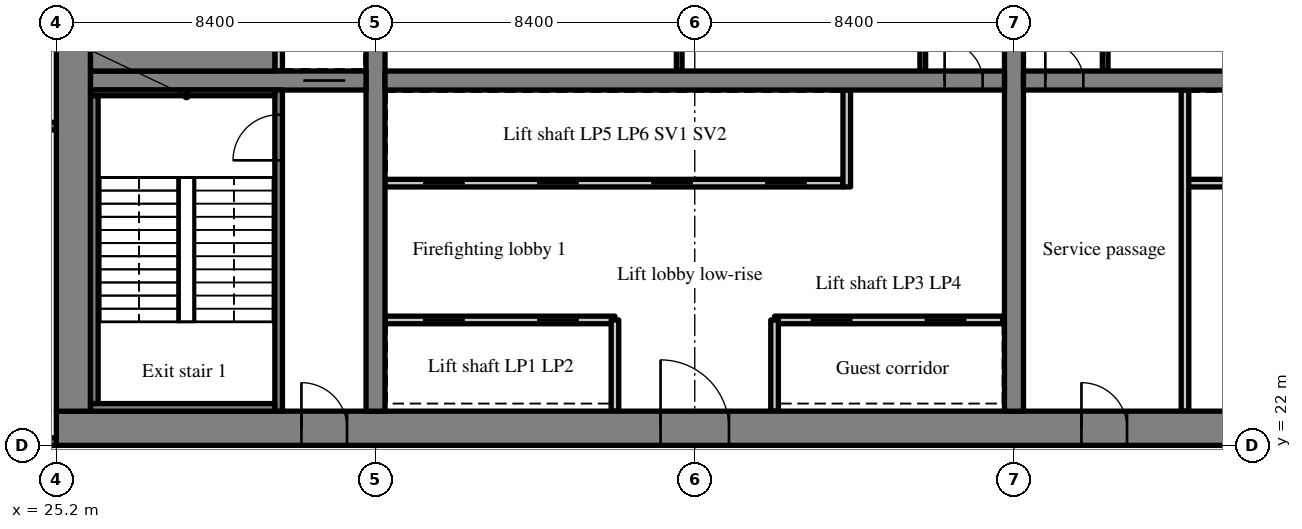
"""IFC4 building model, lengths in metres.
Left out: names, types, materials, properties, quantities, classifications, styles, units other than length and angle.
Written with IfcOpenShell. Run it as: python <this file> out.ifc"""

import sys

from ifc_helpers import new_model, si_unit, direction, frame, frame_2d, origin, place, context, subcontext, project, spatial, rectangle, extrude, source, transform, mapped, element, fill, save


model = new_model("IFC4")
c1 = context("Model", 3, precision=1e-05, world=origin(), true_north=direction((0.0, 1.0)))
c2 = subcontext(c1, "Body", "Model", "MODEL_VIEW")
j1 = project(units=[si_unit("LENGTHUNIT", "METRE"), si_unit("PLANEANGLEUNIT", "RADIAN")], contexts=[c1])
p1 = place(None, origin())
s1 = spatial("IfcSite", under=j1, at=p1, CompositionType="ELEMENT")
p2 = place(p1, origin())
s2 = spatial("IfcBuilding", under=s1, at=p2, CompositionType="ELEMENT")
p3 = place(p2, frame((0.0, 0.0, 102.8)))
s3 = spatial("IfcBuildingStorey", under=s2, at=p3, CompositionType="ELEMENT", Elevation=102.8)
m1 = source(origin(), c2, "Body", "SweptSolid", [
    extrude(rectangle(XDim=50.4, YDim=0.9, at=frame_2d((25.2, 0.0))), origin(), (0.0, 0.0, 1.0), 3.52),
])
p4 = place(p3, frame((25.2, 22.45, 0.0), z_axis=(0.0, 0.0, 1.0), x_axis=(1.0, 0.0, 0.0)))
e1 = element("IfcWall", 1, at=p4, inside=s3, PredefinedType="SHEAR", context=c2, shape_type="MappedRepresentation", body=[
    mapped(m1, transform((0.0, 0.0, 0.0), scale=1.0)),
])
m2 = source(origin(), c2, "Body", "SweptSolid", [
    extrude(rectangle(XDim=1.8, YDim=2.1, at=frame_2d((0.9, 1.05))), frame((0.0, 0.46, 0.0), z_axis=(0.0, -1.0, 0.0), x_axis=(1.0, 0.0, 0.0)), (0.0, 0.0, 1.0), 0.92),
])
p5 = place(p4, frame((15.9, 0.0, 0.0)))
e2 = element("IfcOpeningElement", 2, at=p5, cuts=e1, PredefinedType="OPENING", context=c2, shape_type="MappedRepresentation", body=[
    mapped(m2, transform((0.0, 0.0, 0.0), scale=1.0)),
])
m3 = source(origin(), c2, "Body", "SweptSolid", [
    extrude(rectangle(XDim=1.2, YDim=2.1, at=frame_2d((0.6, 1.05))), frame((0.0, 0.46, 0.0), z_axis=(0.0, -1.0, 0.0), x_axis=(1.0, 0.0, 0.0)), (0.0, 0.0, 1.0), 0.92),
])
p6 = place(p4, frame((26.975, 0.0, 0.0)))
e3 = element("IfcOpeningElement", 3, at=p6, cuts=e1, PredefinedType="OPENING", context=c2, shape_type="MappedRepresentation", body=[
    mapped(m3, transform((0.0, 0.0, 0.0), scale=1.0)),
])
m4 = source(origin(), c2, "Body", "SweptSolid", [
    extrude(rectangle(XDim=0.9, YDim=2.1, at=frame_2d((0.45, 1.05))), frame((0.0, 0.46, 0.0), z_axis=(0.0, -1.0, 0.0), x_axis=(1.0, 0.0, 0.0)), (0.0, 0.0, 1.0), 0.92),
])
p7 = place(p4, frame((32.25, 0.0, 0.0)))
e4 = element("IfcOpeningElement", 4, at=p7, cuts=e1, PredefinedType="OPENING", context=c2, shape_type="MappedRepresentation", body=[
    mapped(m4, transform((0.0, 0.0, 0.0), scale=1.0)),
])
p8 = place(p4, frame((38.275, 0.0, 0.0)))
e5 = element("IfcOpeningElement", 5, at=p8, cuts=e1, PredefinedType="OPENING", context=c2, shape_type="MappedRepresentation", body=[
    mapped(m4, transform((0.0, 0.0, 0.0), scale=1.0)),
])
p9 = place(p4, frame((6.45, 0.0, 0.0)))
e6 = element("IfcOpeningElement", 6, at=p9, cuts=e1, PredefinedType="OPENING", context=c2, shape_type="MappedRepresentation", body=[
    mapped(m3, transform((0.0, 0.0, 0.0), scale=1.0)),
])
p10 = place(p4, frame((47.775, 0.0, 0.0)))
e7 = element("IfcOpeningElement", 7, at=p10, cuts=e1, PredefinedType="OPENING", context=c2, shape_type="MappedRepresentation", body=[
    mapped(m3, transform((0.0, 0.0, 0.0), scale=1.0)),
])
m5 = source(origin(), c2, "Body", "SweptSolid", [
    extrude(rectangle(XDim=18.2, YDim=0.9, at=frame_2d((9.1, 0.0))), origin(), (0.0, 0.0, 1.0), 3.52),
])
p11 = place(p3, frame((25.65, 22.9, 0.0), z_axis=(0.0, 0.0, 1.0), x_axis=(0.0, 1.0, 0.0)))
e8 = element("IfcWall", 8, at=p11, inside=s3, PredefinedType="SHEAR", context=c2, shape_type="MappedRepresentation", body=[
    mapped(m5, transform((0.0, 0.0, 0.0), scale=1.0)),
])
m6 = source(origin(), c2, "Body", "SweptSolid", [
    extrude(rectangle(XDim=18.2, YDim=0.5, at=frame_2d((9.1, 0.0))), origin(), (0.0, 0.0, 1.0), 3.52),
])
p12 = place(p3, frame((33.6, 22.9, 0.0), z_axis=(0.0, 0.0, 1.0), x_axis=(0.0, 1.0, 0.0)))
e9 = element("IfcWall", 9, at=p12, inside=s3, PredefinedType="SHEAR", context=c2, shape_type="MappedRepresentation", body=[
    mapped(m6, transform((0.0, 0.0, 0.0), scale=1.0)),
])
m7 = source(origin(), c2, "Body", "SweptSolid", [
    extrude(rectangle(XDim=1.1, YDim=2.1, at=frame_2d((0.55, 1.05))), frame((0.0, 0.26, 0.0), z_axis=(0.0, -1.0, 0.0), x_axis=(1.0, 0.0, 0.0)), (0.0, 0.0, 1.0), 0.52),
])
p13 = place(p12, frame((12.55, 0.0, 0.0)))
e10 = element("IfcOpeningElement", 10, at=p13, cuts=e9, PredefinedType="OPENING", context=c2, shape_type="MappedRepresentation", body=[
    mapped(m7, transform((0.0, 0.0, 0.0), scale=1.0)),
])
p14 = place(p3, frame((50.4, 22.9, 0.0), z_axis=(0.0, 0.0, 1.0), x_axis=(0.0, 1.0, 0.0)))
e11 = element("IfcWall", 11, at=p14, inside=s3, PredefinedType="SHEAR", context=c2, shape_type="MappedRepresentation", body=[
    mapped(m6, transform((0.0, 0.0, 0.0), scale=1.0)),
])
p15 = place(p14, frame((12.55, 0.0, 0.0)))
e12 = element("IfcOpeningElement", 12, at=p15, cuts=e11, PredefinedType="OPENING", context=c2, shape_type="MappedRepresentation", body=[
    mapped(m7, transform((0.0, 0.0, 0.0), scale=1.0)),
])
m8 = source(origin(), c2, "Body", "SweptSolid", [
    extrude(rectangle(XDim=7.25, YDim=0.5, at=frame_2d((3.625, 0.0))), origin(), (0.0, 0.0, 1.0), 3.52),
])
p16 = place(p3, frame((26.1, 31.6, 0.0), z_axis=(0.0, 0.0, 1.0), x_axis=(1.0, 0.0, 0.0)))
e13 = element("IfcWall", 13, at=p16, inside=s3, PredefinedType="SHEAR", context=c2, shape_type="MappedRepresentation", body=[
    mapped(m8, transform((0.0, 0.0, 0.0), scale=1.0)),
])
p17 = place(p16, frame((5.6, 0.0, 0.0)))
e14 = element("IfcOpeningElement", 14, at=p17, cuts=e13, PredefinedType="OPENING", context=c2, shape_type="MappedRepresentation", body=[
    mapped(m7, transform((0.0, 0.0, 0.0), scale=1.0)),
])
m9 = source(origin(), c2, "Body", "SweptSolid", [
    extrude(rectangle(XDim=16.3, YDim=0.5, at=frame_2d((8.15, 0.0))), origin(), (0.0, 0.0, 1.0), 3.52),
])
p18 = place(p3, frame((33.85, 31.6, 0.0), z_axis=(0.0, 0.0, 1.0), x_axis=(1.0, 0.0, 0.0)))
e15 = element("IfcWall", 15, at=p18, inside=s3, PredefinedType="SHEAR", context=c2, shape_type="MappedRepresentation", body=[
    mapped(m9, transform((0.0, 0.0, 0.0), scale=1.0)),
])
m10 = source(origin(), c2, "Body", "SweptSolid", [
    extrude(rectangle(XDim=1.0, YDim=2.1, at=frame_2d((0.5, 1.05))), frame((0.0, 0.26, 0.0), z_axis=(0.0, -1.0, 0.0), x_axis=(1.0, 0.0, 0.0)), (0.0, 0.0, 1.0), 0.52),
])
p19 = place(p18, frame((14.725, 0.0, 0.0)))
e16 = element("IfcOpeningElement", 16, at=p19, cuts=e15, PredefinedType="OPENING", context=c2, shape_type="MappedRepresentation", body=[
    mapped(m10, transform((0.0, 0.0, 0.0), scale=1.0)),
])
m11 = source(origin(), c2, "Body", "SweptSolid", [
    extrude(rectangle(XDim=16.3, YDim=0.5, at=frame_2d((8.15, 0.0))), origin(), (0.0, 0.0, 1.0), 3.52),
])
p20 = place(p3, frame((50.65, 31.6, 0.0), z_axis=(0.0, 0.0, 1.0), x_axis=(1.0, 0.0, 0.0)))
e17 = element("IfcWall", 17, at=p20, inside=s3, PredefinedType="SHEAR", context=c2, shape_type="MappedRepresentation", body=[
    mapped(m11, transform((0.0, 0.0, 0.0), scale=1.0)),
])
p21 = place(p20, frame((0.575, 0.0, 0.0)))
e18 = element("IfcOpeningElement", 18, at=p21, cuts=e17, PredefinedType="OPENING", context=c2, shape_type="MappedRepresentation", body=[
    mapped(m10, transform((0.0, 0.0, 0.0), scale=1.0)),
])
m12 = source(origin(), c2, "Body", "SweptSolid", [
    extrude(rectangle(XDim=6.05, YDim=0.2, at=frame_2d((3.025, 0.0))), origin(), (0.0, 0.0, 1.0), 3.52),
])
p22 = place(p3, frame((33.85, 25.3, 0.0), z_axis=(0.0, 0.0, 1.0), x_axis=(1.0, 0.0, 0.0)))
e19 = element("IfcWall", 19, at=p22, inside=s3, PredefinedType="SOLIDWALL", context=c2, shape_type="MappedRepresentation", body=[
    mapped(m12, transform((0.0, 0.0, 0.0), scale=1.0)),
])
m13 = source(origin(), c2, "Body", "SweptSolid", [
    extrude(rectangle(XDim=1.1, YDim=2.1, at=frame_2d((0.55, 1.05))), frame((0.0, 0.11, 0.0), z_axis=(0.0, -1.0, 0.0), x_axis=(1.0, 0.0, 0.0)), (0.0, 0.0, 1.0), 0.22),
])
p23 = place(p22, frame((1.0, 0.0, 0.0)))
e20 = element("IfcOpeningElement", 20, at=p23, cuts=e19, PredefinedType="OPENING", context=c2, shape_type="MappedRepresentation", body=[
    mapped(m13, transform((0.0, 0.0, 0.0), scale=1.0)),
])
p24 = place(p22, frame((4.0, 0.0, 0.0)))
e21 = element("IfcOpeningElement", 21, at=p24, cuts=e19, PredefinedType="OPENING", context=c2, shape_type="MappedRepresentation", body=[
    mapped(m13, transform((0.0, 0.0, 0.0), scale=1.0)),
])
m14 = source(origin(), c2, "Body", "SweptSolid", [
    extrude(rectangle(XDim=6.0, YDim=0.2, at=frame_2d((3.0, 0.0))), origin(), (0.0, 0.0, 1.0), 3.52),
])
p25 = place(p3, frame((44.1, 25.3, 0.0), z_axis=(0.0, 0.0, 1.0), x_axis=(1.0, 0.0, 0.0)))
e22 = element("IfcWall", 22, at=p25, inside=s3, PredefinedType="SOLIDWALL", context=c2, shape_type="MappedRepresentation", body=[
    mapped(m14, transform((0.0, 0.0, 0.0), scale=1.0)),
])
p26 = place(p25, frame((0.95, 0.0, 0.0)))
e23 = element("IfcOpeningElement", 23, at=p26, cuts=e22, PredefinedType="OPENING", context=c2, shape_type="MappedRepresentation", body=[
    mapped(m13, transform((0.0, 0.0, 0.0), scale=1.0)),
])
p27 = place(p25, frame((3.95, 0.0, 0.0)))
e24 = element("IfcOpeningElement", 24, at=p27, cuts=e22, PredefinedType="OPENING", context=c2, shape_type="MappedRepresentation", body=[
    mapped(m13, transform((0.0, 0.0, 0.0), scale=1.0)),
])
m15 = source(origin(), c2, "Body", "SweptSolid", [
    extrude(rectangle(XDim=12.05, YDim=0.2, at=frame_2d((6.025, 0.0))), origin(), (0.0, 0.0, 1.0), 3.52),
])
p28 = place(p3, frame((33.85, 28.9, 0.0), z_axis=(0.0, 0.0, 1.0), x_axis=(1.0, 0.0, 0.0)))
e25 = element("IfcWall", 25, at=p28, inside=s3, PredefinedType="SOLIDWALL", context=c2, shape_type="MappedRepresentation", body=[
    mapped(m15, transform((0.0, 0.0, 0.0), scale=1.0)),
])
p29 = place(p28, frame((1.0, 0.0, 0.0)))
e26 = element("IfcOpeningElement", 26, at=p29, cuts=e25, PredefinedType="OPENING", context=c2, shape_type="MappedRepresentation", body=[
    mapped(m13, transform((0.0, 0.0, 0.0), scale=1.0)),
])
p30 = place(p28, frame((4.0, 0.0, 0.0)))
e27 = element("IfcOpeningElement", 27, at=p30, cuts=e25, PredefinedType="OPENING", context=c2, shape_type="MappedRepresentation", body=[
    mapped(m13, transform((0.0, 0.0, 0.0), scale=1.0)),
])
p31 = place(p28, frame((7.0, 0.0, 0.0)))
e28 = element("IfcOpeningElement", 28, at=p31, cuts=e25, PredefinedType="OPENING", context=c2, shape_type="MappedRepresentation", body=[
    mapped(m13, transform((0.0, 0.0, 0.0), scale=1.0)),
])
p32 = place(p28, frame((10.0, 0.0, 0.0)))
e29 = element("IfcOpeningElement", 29, at=p32, cuts=e25, PredefinedType="OPENING", context=c2, shape_type="MappedRepresentation", body=[
    mapped(m13, transform((0.0, 0.0, 0.0), scale=1.0)),
])
m16 = source(origin(), c2, "Body", "SweptSolid", [
    extrude(rectangle(XDim=2.4, YDim=0.2, at=frame_2d((1.2, 0.0))), origin(), (0.0, 0.0, 1.0), 3.52),
])
for number, where, z_axis, x_axis in (
    (30, (39.9, 22.9, 0.0), (0.0, 0.0, 1.0), (0.0, 1.0, 0.0)),
    (31, (44.1, 22.9, 0.0), (0.0, 0.0, 1.0), (0.0, 1.0, 0.0)),
):
    element("IfcWall", number, at=place(p3, frame(where, z_axis=z_axis, x_axis=x_axis)), inside=s3, PredefinedType="SOLIDWALL", context=c2, shape_type="MappedRepresentation", body=[
        mapped(m16, transform((0.0, 0.0, 0.0), scale=1.0)),
    ])
m17 = source(origin(), c2, "Body", "SweptSolid", [
    extrude(rectangle(XDim=2.55, YDim=0.2, at=frame_2d((1.275, 0.0))), origin(), (0.0, 0.0, 1.0), 3.52),
])
p33 = place(p3, frame((46.0, 28.8, 0.0), z_axis=(0.0, 0.0, 1.0), x_axis=(0.0, 1.0, 0.0)))
e32 = element("IfcWall", 32, at=p33, inside=s3, PredefinedType="SOLIDWALL", context=c2, shape_type="MappedRepresentation", body=[
    mapped(m17, transform((0.0, 0.0, 0.0), scale=1.0)),
])
m18 = source(origin(), c2, "Body", "SweptSolid", [
    extrude(rectangle(XDim=3.15, YDim=0.15, at=frame_2d((1.575, 0.0))), origin(), (0.0, 0.0, 1.0), 3.52),
])
for number, where, z_axis, x_axis in (
    (33, (48.0, 31.85, 0.0), (0.0, 0.0, 1.0), (0.0, 1.0, 0.0)),
    (34, (41.591, 31.85, 0.0), (0.0, 0.0, 1.0), (0.0, 1.0, 0.0)),
):
    element("IfcWall", number, at=place(p3, frame(where, z_axis=z_axis, x_axis=x_axis)), inside=s3, PredefinedType="PARTITIONING", context=c2, shape_type="MappedRepresentation", body=[
        mapped(m18, transform((0.0, 0.0, 0.0), scale=1.0)),
    ])
p34 = place(p3, frame((60.9, 28.9, 0.0), z_axis=(0.0, 0.0, 1.0), x_axis=(-1.0, 0.0, 0.0)))
e35 = element("IfcWall", 35, at=p34, inside=s3, PredefinedType="SOLIDWALL", context=c2, shape_type="MappedRepresentation", body=[
    mapped(m14, transform((0.0, 0.0, 0.0), scale=1.0)),
])
m19 = source(origin(), c2, "Body", "SweptSolid", [
    extrude(rectangle(XDim=8.45, YDim=0.2, at=frame_2d((4.225, 0.0))), origin(), (0.0, 0.0, 1.0), 3.52),
])
p35 = place(p3, frame((54.9, 22.9, 0.0), z_axis=(0.0, 0.0, 1.0), x_axis=(0.0, 1.0, 0.0)))
e36 = element("IfcWall", 36, at=p35, inside=s3, PredefinedType="PARTITIONING", context=c2, shape_type="MappedRepresentation", body=[
    mapped(m19, transform((0.0, 0.0, 0.0), scale=1.0)),
])
p36 = place(p3, frame((52.8, 31.85, 0.0), z_axis=(0.0, 0.0, 1.0), x_axis=(0.0, 1.0, 0.0)))
e37 = element("IfcWall", 37, at=p36, inside=s3, PredefinedType="PARTITIONING", context=c2, shape_type="MappedRepresentation", body=[
    mapped(m18, transform((0.0, 0.0, 0.0), scale=1.0)),
])
m20 = source(origin(), c2, "Body", "SweptSolid", [
    extrude(rectangle(XDim=8.45, YDim=0.2, at=frame_2d((4.225, 0.0))), origin(), (0.0, 0.0, 1.0), 3.52),
])
p37 = place(p3, frame((31.05, 22.9, 0.0), z_axis=(0.0, 0.0, 1.0), x_axis=(0.0, 1.0, 0.0)))
e38 = element("IfcWall", 38, at=p37, inside=s3, PredefinedType="SOLIDWALL", context=c2, shape_type="MappedRepresentation", body=[
    mapped(m20, transform((0.0, 0.0, 0.0), scale=1.0)),
])
m21 = source(origin(), c2, "Body", "SweptSolid", [
    extrude(rectangle(XDim=1.2, YDim=2.1, at=frame_2d((0.6, 1.05))), frame((0.0, 0.11, 0.0), z_axis=(0.0, -1.0, 0.0), x_axis=(1.0, 0.0, 0.0)), (0.0, 0.0, 1.0), 0.22),
])
p38 = place(p37, frame((6.6, 0.0, 0.0)))
e39 = element("IfcOpeningElement", 39, at=p38, cuts=e38, PredefinedType="OPENING", context=c2, shape_type="MappedRepresentation", body=[
    mapped(m21, transform((0.0, 0.0, 0.0), scale=1.0)),
])
m22 = source(origin(), c2, "Body", "SweptSolid", [
    extrude(rectangle(XDim=1.75, YDim=0.2, at=frame_2d((0.875, 0.0))), origin(), (0.0, 0.0, 1.0), 3.52),
])
p39 = place(p3, frame((31.05, 31.85, 0.0), z_axis=(0.0, 0.0, 1.0), x_axis=(0.0, 1.0, 0.0)))
e40 = element("IfcWall", 40, at=p39, inside=s3, PredefinedType="SOLIDWALL", context=c2, shape_type="MappedRepresentation", body=[
    mapped(m22, transform((0.0, 0.0, 0.0), scale=1.0)),
])
m23 = source(origin(), c2, "Body", "SweptSolid", [
    extrude(rectangle(XDim=8.225, YDim=0.2, at=frame_2d((4.112, 0.0))), origin(), (0.0, 0.0, 1.0), 3.52),
])
p40 = place(p3, frame((16.975, 22.1, 0.0), z_axis=(0.0, 0.0, 1.0), x_axis=(1.0, 0.0, 0.0)))
e41 = element("IfcWall", 41, at=p40, inside=s3, PredefinedType="SOLIDWALL", context=c2, shape_type="MappedRepresentation", body=[
    mapped(m23, transform((0.0, 0.0, 0.0), scale=1.0)),
])
p41 = place(p40, frame((6.025, 0.0, 0.0)))
e42 = element("IfcOpeningElement", 42, at=p41, cuts=e41, PredefinedType="OPENING", context=c2, shape_type="MappedRepresentation", body=[
    mapped(m21, transform((0.0, 0.0, 0.0), scale=1.0)),
])
p42 = place(p3, frame((16.975, 30.4, 0.0), z_axis=(0.0, 0.0, 1.0), x_axis=(1.0, 0.0, 0.0)))
e43 = element("IfcWall", 43, at=p42, inside=s3, PredefinedType="SOLIDWALL", context=c2, shape_type="MappedRepresentation", body=[
    mapped(m23, transform((0.0, 0.0, 0.0), scale=1.0)),
])
m24 = source(origin(), c2, "Body", "SweptSolid", [
    extrude(rectangle(XDim=1.0, YDim=2.1, at=frame_2d((0.5, 1.05))), frame((0.0, 0.11, 0.0), z_axis=(0.0, -1.0, 0.0), x_axis=(1.0, 0.0, 0.0)), (0.0, 0.0, 1.0), 0.22),
])
p43 = place(p42, frame((6.125, 0.0, 0.0)))
e44 = element("IfcOpeningElement", 44, at=p43, cuts=e43, PredefinedType="OPENING", context=c2, shape_type="MappedRepresentation", body=[
    mapped(m24, transform((0.0, 0.0, 0.0), scale=1.0)),
])
m25 = source(origin(), c2, "Body", "SweptSolid", [
    extrude(rectangle(XDim=4.85, YDim=0.2, at=frame_2d((2.425, 0.0))), origin(), (0.0, 0.0, 1.0), 3.52),
])
p44 = place(p3, frame((26.1, 23.0, 0.0), z_axis=(0.0, 0.0, 1.0), x_axis=(1.0, 0.0, 0.0)))
e45 = element("IfcWall", 45, at=p44, inside=s3, PredefinedType="SOLIDWALL", context=c2, shape_type="MappedRepresentation", body=[
    mapped(m25, transform((0.0, 0.0, 0.0), scale=1.0)),
])
m26 = source(origin(), c2, "Body", "SweptSolid", [
    extrude(rectangle(XDim=4.85, YDim=0.15, at=frame_2d((2.425, 0.0))), origin(), (0.0, 0.0, 1.0), 3.52),
])
p45 = place(p3, frame((26.1, 31.275, 0.0), z_axis=(0.0, 0.0, 1.0), x_axis=(1.0, 0.0, 0.0)))
e46 = element("IfcWall", 46, at=p45, inside=s3, PredefinedType="SOLIDWALL", context=c2, shape_type="MappedRepresentation", body=[
    mapped(m26, transform((0.0, 0.0, 0.0), scale=1.0)),
])
m27 = source(origin(), c2, "Body", "SweptSolid", [
    extrude(rectangle(XDim=8.1, YDim=0.2, at=frame_2d((4.05, 0.0))), origin(), (0.0, 0.0, 1.0), 3.52),
])
p46 = place(p3, frame((26.2, 23.1, 0.0), z_axis=(0.0, 0.0, 1.0), x_axis=(0.0, 1.0, 0.0)))
e47 = element("IfcWall", 47, at=p46, inside=s3, PredefinedType="SOLIDWALL", context=c2, shape_type="MappedRepresentation", body=[
    mapped(m27, transform((0.0, 0.0, 0.0), scale=1.0)),
])
m28 = source(origin(), c2, "Body", "SweptSolid", [
    extrude(rectangle(XDim=4.85, YDim=0.95, at=frame_2d((2.425, 0.0))), origin(), (0.0, 0.0, 1.0), 3.52),
])
p47 = place(p3, frame((26.1, 32.325, 0.0), z_axis=(0.0, 0.0, 1.0), x_axis=(1.0, 0.0, 0.0)))
e48 = element("IfcWall", 48, at=p47, inside=s3, PredefinedType="SOLIDWALL", context=c2, shape_type="MappedRepresentation", body=[
    mapped(m28, transform((0.0, 0.0, 0.0), scale=1.0)),
])
m29 = source(origin(), c2, "Body", "SweptSolid", [
    extrude(rectangle(XDim=1.8, YDim=2.1, at=frame_2d((0.9, 1.05))), frame((0.0, 0.375, 0.0), z_axis=(0.0, -1.0, 0.0), x_axis=(1.0, 0.0, 0.0)), (0.0, 0.0, 1.0), 0.05),
])
p48 = place(p5, origin())
e49 = element("IfcDoor", 49, at=p48, inside=s3, OperationType="DOUBLE_DOOR_SINGLE_SWING", PredefinedType="DOOR", context=c2, shape_type="MappedRepresentation", body=[
    mapped(m29, transform((0.0, 0.0, 0.0), scale=1.0)),
])
fill(e2, e49)
m30 = source(origin(), c2, "Body", "SweptSolid", [
    extrude(rectangle(XDim=1.0, YDim=2.1, at=frame_2d((0.5, 1.05))), frame((0.0, 0.025, 0.0), z_axis=(0.0, -1.0, 0.0), x_axis=(1.0, 0.0, 0.0)), (0.0, 0.0, 1.0), 0.05),
])
p49 = place(p19, origin())
e50 = element("IfcDoor", 50, at=p49, inside=s3, OperationType="SINGLE_SWING_LEFT", PredefinedType="DOOR", context=c2, shape_type="MappedRepresentation", body=[
    mapped(m30, transform((0.0, 0.0, 0.0), scale=1.0)),
])
fill(e16, e50)
m31 = source(origin(), c2, "Body", "SweptSolid", [
    extrude(rectangle(XDim=1.1, YDim=2.1, at=frame_2d((0.55, 1.05))), frame((0.0, 0.025, 0.0), z_axis=(0.0, -1.0, 0.0), x_axis=(1.0, 0.0, 0.0)), (0.0, 0.0, 1.0), 0.05),
])
p50 = place(p23, origin())
e51 = element("IfcDoor", 51, at=p50, inside=s3, OperationType="SLIDING_TO_LEFT", PredefinedType="DOOR", context=c2, shape_type="MappedRepresentation", body=[
    mapped(m31, transform((0.0, 0.0, 0.0), scale=1.0)),
])
fill(e20, e51)
p51 = place(p24, origin())
e52 = element("IfcDoor", 52, at=p51, inside=s3, OperationType="SLIDING_TO_RIGHT", PredefinedType="DOOR", context=c2, shape_type="MappedRepresentation", body=[
    mapped(m31, transform((0.0, 0.0, 0.0), scale=1.0)),
])
fill(e21, e52)
p52 = place(p26, origin())
e53 = element("IfcDoor", 53, at=p52, inside=s3, OperationType="SLIDING_TO_LEFT", PredefinedType="DOOR", context=c2, shape_type="MappedRepresentation", body=[
    mapped(m31, transform((0.0, 0.0, 0.0), scale=1.0)),
])
fill(e23, e53)
p53 = place(p27, origin())
e54 = element("IfcDoor", 54, at=p53, inside=s3, OperationType="SLIDING_TO_RIGHT", PredefinedType="DOOR", context=c2, shape_type="MappedRepresentation", body=[
    mapped(m31, transform((0.0, 0.0, 0.0), scale=1.0)),
])
fill(e24, e54)
p54 = place(p29, origin())
e55 = element("IfcDoor", 55, at=p54, inside=s3, OperationType="SLIDING_TO_LEFT", PredefinedType="DOOR", context=c2, shape_type="MappedRepresentation", body=[
    mapped(m31, transform((0.0, 0.0, 0.0), scale=1.0)),
])
fill(e26, e55)
p55 = place(p30, origin())
e56 = element("IfcDoor", 56, at=p55, inside=s3, OperationType="SLIDING_TO_RIGHT", PredefinedType="DOOR", context=c2, shape_type="MappedRepresentation", body=[
    mapped(m31, transform((0.0, 0.0, 0.0), scale=1.0)),
])
fill(e27, e56)
p56 = place(p31, origin())
e57 = element("IfcDoor", 57, at=p56, inside=s3, OperationType="SLIDING_TO_LEFT", PredefinedType="DOOR", context=c2, shape_type="MappedRepresentation", body=[
    mapped(m31, transform((0.0, 0.0, 0.0), scale=1.0)),
])
fill(e28, e57)
p57 = place(p32, origin())
e58 = element("IfcDoor", 58, at=p57, inside=s3, OperationType="SLIDING_TO_RIGHT", PredefinedType="DOOR", context=c2, shape_type="MappedRepresentation", body=[
    mapped(m31, transform((0.0, 0.0, 0.0), scale=1.0)),
])
fill(e29, e58)
m32 = source(origin(), c2, "Body", "SweptSolid", [
    extrude(rectangle(XDim=1.2, YDim=2.1, at=frame_2d((0.6, 1.05))), frame((0.0, 0.375, 0.0), z_axis=(0.0, -1.0, 0.0), x_axis=(1.0, 0.0, 0.0)), (0.0, 0.0, 1.0), 0.05),
])
p58 = place(p6, origin())
e59 = element("IfcDoor", 59, at=p58, inside=s3, OperationType="SINGLE_SWING_LEFT", PredefinedType="DOOR", context=c2, shape_type="MappedRepresentation", body=[
    mapped(m32, transform((0.0, 0.0, 0.0), scale=1.0)),
])
fill(e3, e59)
p59 = place(p21, origin())
e60 = element("IfcDoor", 60, at=p59, inside=s3, OperationType="SINGLE_SWING_LEFT", PredefinedType="DOOR", context=c2, shape_type="MappedRepresentation", body=[
    mapped(m30, transform((0.0, 0.0, 0.0), scale=1.0)),
])
fill(e18, e60)
m33 = source(origin(), c2, "Body", "SweptSolid", [
    extrude(rectangle(XDim=1.2, YDim=2.1, at=frame_2d((0.6, 1.05))), frame((0.0, 0.025, 0.0), z_axis=(0.0, -1.0, 0.0), x_axis=(1.0, 0.0, 0.0)), (0.0, 0.0, 1.0), 0.05),
])
p60 = place(p38, origin())
e61 = element("IfcDoor", 61, at=p60, inside=s3, OperationType="SINGLE_SWING_LEFT", PredefinedType="DOOR", context=c2, shape_type="MappedRepresentation", body=[
    mapped(m33, transform((0.0, 0.0, 0.0), scale=1.0)),
])
fill(e39, e61)
p61 = place(p9, origin())
e62 = element("IfcDoor", 62, at=p61, inside=s3, OperationType="SINGLE_SWING_LEFT", PredefinedType="DOOR", context=c2, shape_type="MappedRepresentation", body=[
    mapped(m32, transform((0.0, 0.0, 0.0), scale=1.0)),
])
fill(e6, e62)
p62 = place(p17, origin())
e63 = element("IfcDoor", 63, at=p62, inside=s3, OperationType="SLIDING_TO_RIGHT", PredefinedType="DOOR", context=c2, shape_type="MappedRepresentation", body=[
    mapped(m31, transform((0.0, 0.0, 0.0), scale=1.0)),
])
fill(e14, e63)
save(model, sys.argv[1])
